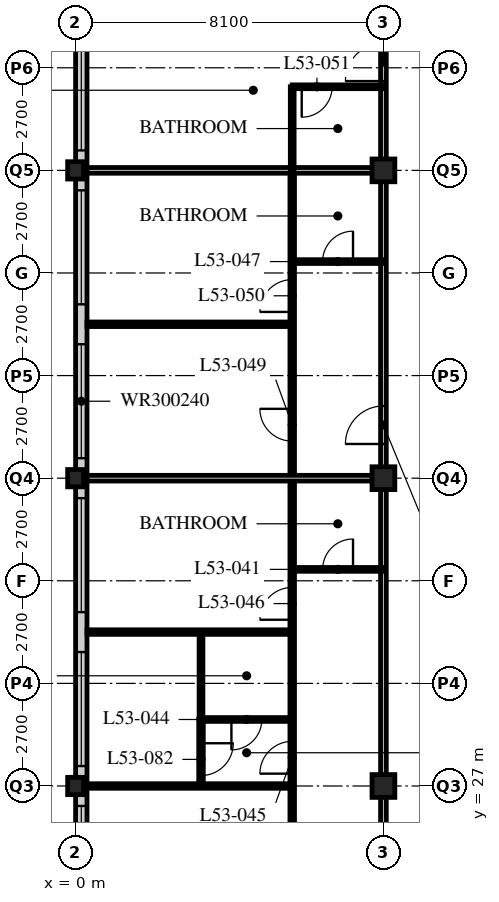
"""IFC4 building model, lengths in metres.
Left out: names, types, materials, properties, quantities, classifications, styles, units other than length and angle.
Written with IfcOpenShell. Run it as: python <this file> out.ifc"""

import sys

from ifc_helpers import new_model, si_unit, direction, frame, frame_2d, origin, origin_2d, place, context, subcontext, project, spatial, rectangle, hollow_rectangle, i_section, extrude, element, fill, save


model = new_model("IFC4")
c1 = context("Model", 3, precision=1e-05, world=origin(), true_north=direction((0.0, 1.0)))
c2 = subcontext(c1, "Body", "Model", "MODEL_VIEW")
j1 = project(units=[si_unit("LENGTHUNIT", "METRE"), si_unit("PLANEANGLEUNIT", "RADIAN")], contexts=[c1])
p1 = place(None, origin())
s1 = spatial("IfcSite", under=j1, at=p1, CompositionType="ELEMENT")
p2 = place(p1, origin())
s2 = spatial("IfcBuilding", under=s1, at=p2, CompositionType="ELEMENT")
p3 = place(p2, frame((0.0, 0.0, 206.4)))
s3 = spatial("IfcBuildingStorey", under=s2, at=p3, CompositionType="ELEMENT", Elevation=206.4)
for number, where, z_axis, x_axis in (
    (1, (0.0, 27.0, 0.0), (0.0, 0.0, 1.0), (1.0, 0.0, 0.0)),
    (2, (0.0, 35.1, 0.0), (0.0, 0.0, 1.0), (1.0, 0.0, 0.0)),
    (3, (0.0, 43.2, 0.0), (0.0, 0.0, 1.0), (1.0, 0.0, 0.0)),
):
    element("IfcColumn", number, at=place(p3, frame(where, z_axis=z_axis, x_axis=x_axis)), inside=s3, PredefinedType="COLUMN", context=c2, shape_type="SweptSolid", body=[
        extrude(i_section(OverallWidth=0.418, OverallDepth=0.456, WebThickness=0.042, FlangeThickness=0.067, FilletRadius=0.015, at=origin_2d()), origin(), (0.0, 0.0, 1.0), 3.6),
    ])
for number, where, z_axis, x_axis in (
    (4, (8.1, 27.0, 0.0), (0.0, 0.0, 1.0), (1.0, 0.0, 0.0)),
    (5, (8.1, 35.1, 0.0), (0.0, 0.0, 1.0), (1.0, 0.0, 0.0)),
    (6, (8.1, 43.2, 0.0), (0.0, 0.0, 1.0), (1.0, 0.0, 0.0)),
):
    element("IfcColumn", number, at=place(p3, frame(where, z_axis=z_axis, x_axis=x_axis)), inside=s3, PredefinedType="COLUMN", context=c2, shape_type="SweptSolid", body=[
        extrude(hollow_rectangle(XDim=0.6, YDim=0.6, WallThickness=0.05, at=origin_2d()), origin(), (0.0, 0.0, 1.0), 3.6),
    ])
p4 = place(p3, frame((0.15, 51.0, 0.0), z_axis=(0.0, 0.0, 1.0), x_axis=(0.0, -1.0, 0.0)))
e7 = element("IfcWall", 7, at=p4, inside=s3, PredefinedType="SOLIDWALL", context=c2, shape_type="SweptSolid", body=[
    extrude(rectangle(XDim=32.1, YDim=0.3, at=frame_2d((16.05, 0.0))), origin(), (0.0, 0.0, 1.0), 3.39),
])
p5 = place(p4, frame((0.225, 0.0, 0.6)))
e8 = element("IfcOpeningElement", 8, at=p5, cuts=e7, PredefinedType="OPENING", context=c2, shape_type="SweptSolid", body=[
    extrude(rectangle(XDim=3.0, YDim=2.4, at=frame_2d((1.5, 1.2))), frame((0.0, 0.16, 0.0), z_axis=(0.0, -1.0, 0.0), x_axis=(1.0, 0.0, 0.0)), (0.0, 0.0, 1.0), 0.32),
])
p6 = place(p4, frame((4.275, 0.0, 0.6)))
e9 = element("IfcOpeningElement", 9, at=p6, cuts=e7, PredefinedType="OPENING", context=c2, shape_type="SweptSolid", body=[
    extrude(rectangle(XDim=3.0, YDim=2.4, at=frame_2d((1.5, 1.2))), frame((0.0, 0.16, 0.0), z_axis=(0.0, -1.0, 0.0), x_axis=(1.0, 0.0, 0.0)), (0.0, 0.0, 1.0), 0.32),
])
p7 = place(p4, frame((8.325, 0.0, 0.6)))
e10 = element("IfcOpeningElement", 10, at=p7, cuts=e7, PredefinedType="OPENING", context=c2, shape_type="SweptSolid", body=[
    extrude(rectangle(XDim=3.0, YDim=2.4, at=frame_2d((1.5, 1.2))), frame((0.0, 0.16, 0.0), z_axis=(0.0, -1.0, 0.0), x_axis=(1.0, 0.0, 0.0)), (0.0, 0.0, 1.0), 0.32),
])
p8 = place(p4, frame((12.375, 0.0, 0.6)))
e11 = element("IfcOpeningElement", 11, at=p8, cuts=e7, PredefinedType="OPENING", context=c2, shape_type="SweptSolid", body=[
    extrude(rectangle(XDim=3.0, YDim=2.4, at=frame_2d((1.5, 1.2))), frame((0.0, 0.16, 0.0), z_axis=(0.0, -1.0, 0.0), x_axis=(1.0, 0.0, 0.0)), (0.0, 0.0, 1.0), 0.32),
])
p9 = place(p4, frame((16.425, 0.0, 0.6)))
e12 = element("IfcOpeningElement", 12, at=p9, cuts=e7, PredefinedType="OPENING", context=c2, shape_type="SweptSolid", body=[
    extrude(rectangle(XDim=3.0, YDim=2.4, at=frame_2d((1.5, 1.2))), frame((0.0, 0.16, 0.0), z_axis=(0.0, -1.0, 0.0), x_axis=(1.0, 0.0, 0.0)), (0.0, 0.0, 1.0), 0.32),
])
p10 = place(p4, frame((20.475, 0.0, 0.6)))
e13 = element("IfcOpeningElement", 13, at=p10, cuts=e7, PredefinedType="OPENING", context=c2, shape_type="SweptSolid", body=[
    extrude(rectangle(XDim=3.0, YDim=2.4, at=frame_2d((1.5, 1.2))), frame((0.0, 0.16, 0.0), z_axis=(0.0, -1.0, 0.0), x_axis=(1.0, 0.0, 0.0)), (0.0, 0.0, 1.0), 0.32),
])
p11 = place(p4, frame((24.525, 0.0, 0.6)))
e14 = element("IfcOpeningElement", 14, at=p11, cuts=e7, PredefinedType="OPENING", context=c2, shape_type="SweptSolid", body=[
    extrude(rectangle(XDim=3.0, YDim=2.4, at=frame_2d((1.5, 1.2))), frame((0.0, 0.16, 0.0), z_axis=(0.0, -1.0, 0.0), x_axis=(1.0, 0.0, 0.0)), (0.0, 0.0, 1.0), 0.32),
])
p12 = place(p4, frame((28.575, 0.0, 0.6)))
e15 = element("IfcOpeningElement", 15, at=p12, cuts=e7, PredefinedType="OPENING", context=c2, shape_type="SweptSolid", body=[
    extrude(rectangle(XDim=3.0, YDim=2.4, at=frame_2d((1.5, 1.2))), frame((0.0, 0.16, 0.0), z_axis=(0.0, -1.0, 0.0), x_axis=(1.0, 0.0, 0.0)), (0.0, 0.0, 1.0), 0.32),
])
p13 = place(p3, frame((8.1, 18.9, 0.0), z_axis=(0.0, 0.0, 1.0), x_axis=(0.0, 1.0, 0.0)))
e16 = element("IfcWall", 16, at=p13, inside=s3, PredefinedType="PARTITIONING", context=c2, shape_type="SweptSolid", body=[
    extrude(rectangle(XDim=28.35, YDim=0.15, at=frame_2d((14.175, 0.0))), origin(), (0.0, 0.0, 1.0), 2.778),
])
p14 = place(p13, frame((0.9, 0.0, 0.0)))
e17 = element("IfcOpeningElement", 17, at=p14, cuts=e16, PredefinedType="OPENING", context=c2, shape_type="SweptSolid", body=[
    extrude(rectangle(XDim=1.0, YDim=2.1, at=frame_2d((0.5, 1.05))), frame((0.0, 0.085, 0.0), z_axis=(0.0, -1.0, 0.0), x_axis=(1.0, 0.0, 0.0)), (0.0, 0.0, 1.0), 0.17),
])
p15 = place(p13, frame((17.1, 0.0, 0.0)))
e18 = element("IfcOpeningElement", 18, at=p15, cuts=e16, PredefinedType="OPENING", context=c2, shape_type="SweptSolid", body=[
    extrude(rectangle(XDim=1.0, YDim=2.1, at=frame_2d((0.5, 1.05))), frame((0.0, 0.085, 0.0), z_axis=(0.0, -1.0, 0.0), x_axis=(1.0, 0.0, 0.0)), (0.0, 0.0, 1.0), 0.17),
])
p16 = place(p13, frame((26.65, 0.0, 0.0)))
e19 = element("IfcOpeningElement", 19, at=p16, cuts=e16, PredefinedType="OPENING", context=c2, shape_type="SweptSolid", body=[
    extrude(rectangle(XDim=1.0, YDim=2.1, at=frame_2d((0.5, 1.05))), frame((0.0, 0.085, 0.0), z_axis=(0.0, -1.0, 0.0), x_axis=(1.0, 0.0, 0.0)), (0.0, 0.0, 1.0), 0.17),
])
p17 = place(p3, frame((5.7, 18.9, 0.0), z_axis=(0.0, 0.0, 1.0), x_axis=(0.0, 1.0, 0.0)))
e20 = element("IfcWall", 20, at=p17, inside=s3, PredefinedType="PARTITIONING", context=c2, shape_type="SweptSolid", body=[
    extrude(rectangle(XDim=24.3, YDim=0.12, at=frame_2d((12.15, 0.0))), origin(), (0.0, 0.0, 1.0), 3.39),
])
p18 = place(p17, frame((0.975, 0.0, 0.0)))
e21 = element("IfcOpeningElement", 21, at=p18, cuts=e20, PredefinedType="OPENING", context=c2, shape_type="SweptSolid", body=[
    extrude(rectangle(XDim=0.85, YDim=2.1, at=frame_2d((0.425, 1.05))), frame((0.0, 0.07, 0.0), z_axis=(0.0, -1.0, 0.0), x_axis=(1.0, 0.0, 0.0)), (0.0, 0.0, 1.0), 0.14),
])
p19 = place(p17, frame((8.425, 0.0, 0.0)))
e22 = element("IfcOpeningElement", 22, at=p19, cuts=e20, PredefinedType="OPENING", context=c2, shape_type="SweptSolid", body=[
    extrude(rectangle(XDim=0.85, YDim=2.1, at=frame_2d((0.425, 1.05))), frame((0.0, 0.07, 0.0), z_axis=(0.0, -1.0, 0.0), x_axis=(1.0, 0.0, 0.0)), (0.0, 0.0, 1.0), 0.14),
])
p20 = place(p17, frame((12.475, 0.0, 0.0)))
e23 = element("IfcOpeningElement", 23, at=p20, cuts=e20, PredefinedType="OPENING", context=c2, shape_type="SweptSolid", body=[
    extrude(rectangle(XDim=0.85, YDim=2.1, at=frame_2d((0.425, 1.05))), frame((0.0, 0.07, 0.0), z_axis=(0.0, -1.0, 0.0), x_axis=(1.0, 0.0, 0.0)), (0.0, 0.0, 1.0), 0.14),
])
p21 = place(p17, frame((17.175, 0.0, 0.0)))
e24 = element("IfcOpeningElement", 24, at=p21, cuts=e20, PredefinedType="OPENING", context=c2, shape_type="SweptSolid", body=[
    extrude(rectangle(XDim=0.85, YDim=2.1, at=frame_2d((0.425, 1.05))), frame((0.0, 0.07, 0.0), z_axis=(0.0, -1.0, 0.0), x_axis=(1.0, 0.0, 0.0)), (0.0, 0.0, 1.0), 0.14),
])
p22 = place(p17, frame((20.575, 0.0, 0.0)))
e25 = element("IfcOpeningElement", 25, at=p22, cuts=e20, PredefinedType="OPENING", context=c2, shape_type="SweptSolid", body=[
    extrude(rectangle(XDim=0.85, YDim=2.1, at=frame_2d((0.425, 1.05))), frame((0.0, 0.07, 0.0), z_axis=(0.0, -1.0, 0.0), x_axis=(1.0, 0.0, 0.0)), (0.0, 0.0, 1.0), 0.14),
])
p23 = place(p3, frame((8.1, 32.7, 0.0), z_axis=(0.0, 0.0, 1.0), x_axis=(-1.0, 0.0, 0.0)))
e26 = element("IfcWall", 26, at=p23, inside=s3, PredefinedType="PARTITIONING", context=c2, shape_type="SweptSolid", body=[
    extrude(rectangle(XDim=2.4, YDim=0.1, at=frame_2d((1.2, 0.0))), origin(), (0.0, 0.0, 1.0), 3.39),
])
p24 = place(p23, frame((0.8, 0.0, 0.0)))
e27 = element("IfcOpeningElement", 27, at=p24, cuts=e26, PredefinedType="OPENING", context=c2, shape_type="SweptSolid", body=[
    extrude(rectangle(XDim=0.8, YDim=2.1, at=frame_2d((0.4, 1.05))), frame((0.0, 0.06, 0.0), z_axis=(0.0, -1.0, 0.0), x_axis=(1.0, 0.0, 0.0)), (0.0, 0.0, 1.0), 0.12),
])
p25 = place(p3, frame((5.7, 28.75, 0.0), z_axis=(0.0, 0.0, 1.0), x_axis=(-1.0, 0.0, 0.0)))
e28 = element("IfcWall", 28, at=p25, inside=s3, PredefinedType="PARTITIONING", context=c2, shape_type="SweptSolid", body=[
    extrude(rectangle(XDim=2.4, YDim=0.1, at=frame_2d((1.2, 0.0))), origin(), (0.0, 0.0, 1.0), 3.39),
])
p26 = place(p25, frame((0.8, 0.0, 0.0)))
e29 = element("IfcOpeningElement", 29, at=p26, cuts=e28, PredefinedType="OPENING", context=c2, shape_type="SweptSolid", body=[
    extrude(rectangle(XDim=0.8, YDim=2.1, at=frame_2d((0.4, 1.05))), frame((0.0, 0.06, 0.0), z_axis=(0.0, -1.0, 0.0), x_axis=(1.0, 0.0, 0.0)), (0.0, 0.0, 1.0), 0.12),
])
p27 = place(p3, frame((3.3, 28.75, 0.0), z_axis=(0.0, 0.0, 1.0), x_axis=(0.0, 1.0, 0.0)))
e30 = element("IfcWall", 30, at=p27, inside=s3, PredefinedType="PARTITIONING", context=c2, shape_type="SweptSolid", body=[
    extrude(rectangle(XDim=2.3, YDim=0.1, at=frame_2d((1.15, 0.0))), origin(), (0.0, 0.0, 1.0), 3.39),
])
p28 = place(p3, frame((5.7, 27.0, 0.0), z_axis=(0.0, 0.0, 1.0), x_axis=(-1.0, 0.0, 0.0)))
e31 = element("IfcWall", 31, at=p28, inside=s3, PredefinedType="PARTITIONING", context=c2, shape_type="SweptSolid", body=[
    extrude(rectangle(XDim=5.4, YDim=0.12, at=frame_2d((2.7, 0.0))), origin(), (0.0, 0.0, 1.0), 2.778),
])
p29 = place(p3, frame((5.7, 31.05, 0.0), z_axis=(0.0, 0.0, 1.0), x_axis=(-1.0, 0.0, 0.0)))
e32 = element("IfcWall", 32, at=p29, inside=s3, PredefinedType="PARTITIONING", context=c2, shape_type="SweptSolid", body=[
    extrude(rectangle(XDim=5.4, YDim=0.12, at=frame_2d((2.7, 0.0))), origin(), (0.0, 0.0, 1.0), 3.39),
])
p30 = place(p3, frame((8.1, 35.1, 0.0), z_axis=(0.0, 0.0, 1.0), x_axis=(-1.0, 0.0, 0.0)))
e33 = element("IfcWall", 33, at=p30, inside=s3, PredefinedType="PARTITIONING", context=c2, shape_type="SweptSolid", body=[
    extrude(rectangle(XDim=7.8, YDim=0.15, at=frame_2d((3.9, 0.0))), origin(), (0.0, 0.0, 1.0), 2.778),
])
p31 = place(p3, frame((8.1, 40.8, 0.0), z_axis=(0.0, 0.0, 1.0), x_axis=(-1.0, 0.0, 0.0)))
e34 = element("IfcWall", 34, at=p31, inside=s3, PredefinedType="PARTITIONING", context=c2, shape_type="SweptSolid", body=[
    extrude(rectangle(XDim=2.4, YDim=0.1, at=frame_2d((1.2, 0.0))), origin(), (0.0, 0.0, 1.0), 3.39),
])
p32 = place(p31, frame((0.8, 0.0, 0.0)))
e35 = element("IfcOpeningElement", 35, at=p32, cuts=e34, PredefinedType="OPENING", context=c2, shape_type="SweptSolid", body=[
    extrude(rectangle(XDim=0.8, YDim=2.1, at=frame_2d((0.4, 1.05))), frame((0.0, 0.06, 0.0), z_axis=(0.0, -1.0, 0.0), x_axis=(1.0, 0.0, 0.0)), (0.0, 0.0, 1.0), 0.12),
])
p33 = place(p3, frame((5.7, 39.15, 0.0), z_axis=(0.0, 0.0, 1.0), x_axis=(-1.0, 0.0, 0.0)))
e36 = element("IfcWall", 36, at=p33, inside=s3, PredefinedType="PARTITIONING", context=c2, shape_type="SweptSolid", body=[
    extrude(rectangle(XDim=5.4, YDim=0.12, at=frame_2d((2.7, 0.0))), origin(), (0.0, 0.0, 1.0), 3.39),
])
p34 = place(p3, frame((8.1, 43.2, 0.0), z_axis=(0.0, 0.0, 1.0), x_axis=(-1.0, 0.0, 0.0)))
e37 = element("IfcWall", 37, at=p34, inside=s3, PredefinedType="PARTITIONING", context=c2, shape_type="SweptSolid", body=[
    extrude(rectangle(XDim=7.8, YDim=0.15, at=frame_2d((3.9, 0.0))), origin(), (0.0, 0.0, 1.0), 2.778),
])
p35 = place(p3, frame((5.7, 43.2, 0.0), z_axis=(0.0, 0.0, 1.0), x_axis=(0.0, 1.0, 0.0)))
e38 = element("IfcWall", 38, at=p35, inside=s3, PredefinedType="PARTITIONING", context=c2, shape_type="SweptSolid", body=[
    extrude(rectangle(XDim=2.2, YDim=0.1, at=frame_2d((1.1, 0.0))), origin(), (0.0, 0.0, 1.0), 3.39),
])
p36 = place(p3, frame((8.1, 45.4, 0.0), z_axis=(0.0, 0.0, 1.0), x_axis=(-1.0, 0.0, 0.0)))
e39 = element("IfcWall", 39, at=p36, inside=s3, PredefinedType="PARTITIONING", context=c2, shape_type="SweptSolid", body=[
    extrude(rectangle(XDim=2.4, YDim=0.1, at=frame_2d((1.2, 0.0))), origin(), (0.0, 0.0, 1.0), 3.39),
])
p37 = place(p36, frame((1.35, 0.0, 0.0)))
e40 = element("IfcOpeningElement", 40, at=p37, cuts=e39, PredefinedType="OPENING", context=c2, shape_type="SweptSolid", body=[
    extrude(rectangle(XDim=0.8, YDim=2.1, at=frame_2d((0.4, 1.05))), frame((0.0, 0.06, 0.0), z_axis=(0.0, -1.0, 0.0), x_axis=(1.0, 0.0, 0.0)), (0.0, 0.0, 1.0), 0.12),
])
p38 = place(p3, frame((3.3, 27.0, 0.0), z_axis=(0.0, 0.0, 1.0), x_axis=(0.0, 1.0, 0.0)))
e41 = element("IfcWall", 41, at=p38, inside=s3, PredefinedType="PARTITIONING", context=c2, shape_type="SweptSolid", body=[
    extrude(rectangle(XDim=1.76, YDim=0.12, at=frame_2d((0.88, 0.0))), origin(), (0.0, 0.0, 1.0), 3.39),
])
p39 = place(p38, frame((0.275, 0.0, 0.0)))
e42 = element("IfcOpeningElement", 42, at=p39, cuts=e41, PredefinedType="OPENING", context=c2, shape_type="SweptSolid", body=[
    extrude(rectangle(XDim=0.85, YDim=2.1, at=frame_2d((0.425, 1.05))), frame((0.0, 0.07, 0.0), z_axis=(0.0, -1.0, 0.0), x_axis=(1.0, 0.0, 0.0)), (0.0, 0.0, 1.0), 0.14),
])
p40 = place(p6, origin())
e43 = element("IfcWindow", 43, at=p40, inside=s3, PartitioningType="SINGLE_PANEL", PredefinedType="WINDOW", context=c2, shape_type="SweptSolid", body=[
    extrude(rectangle(XDim=3.0, YDim=2.4, at=frame_2d((1.5, 1.2))), frame((0.0, 0.03, 0.0), z_axis=(0.0, -1.0, 0.0), x_axis=(1.0, 0.0, 0.0)), (0.0, 0.0, 1.0), 0.06),
])
fill(e9, e43)
p41 = place(p7, origin())
e44 = element("IfcWindow", 44, at=p41, inside=s3, PartitioningType="SINGLE_PANEL", PredefinedType="WINDOW", context=c2, shape_type="SweptSolid", body=[
    extrude(rectangle(XDim=3.0, YDim=2.4, at=frame_2d((1.5, 1.2))), frame((0.0, 0.03, 0.0), z_axis=(0.0, -1.0, 0.0), x_axis=(1.0, 0.0, 0.0)), (0.0, 0.0, 1.0), 0.06),
])
fill(e10, e44)
p42 = place(p8, origin())
e45 = element("IfcWindow", 45, at=p42, inside=s3, PartitioningType="SINGLE_PANEL", PredefinedType="WINDOW", context=c2, shape_type="SweptSolid", body=[
    extrude(rectangle(XDim=3.0, YDim=2.4, at=frame_2d((1.5, 1.2))), frame((0.0, 0.03, 0.0), z_axis=(0.0, -1.0, 0.0), x_axis=(1.0, 0.0, 0.0)), (0.0, 0.0, 1.0), 0.06),
])
fill(e11, e45)
p43 = place(p9, origin())
e46 = element("IfcWindow", 46, at=p43, inside=s3, PartitioningType="SINGLE_PANEL", PredefinedType="WINDOW", context=c2, shape_type="SweptSolid", body=[
    extrude(rectangle(XDim=3.0, YDim=2.4, at=frame_2d((1.5, 1.2))), frame((0.0, 0.03, 0.0), z_axis=(0.0, -1.0, 0.0), x_axis=(1.0, 0.0, 0.0)), (0.0, 0.0, 1.0), 0.06),
])
fill(e12, e46)
p44 = place(p10, origin())
e47 = element("IfcWindow", 47, at=p44, inside=s3, PartitioningType="SINGLE_PANEL", PredefinedType="WINDOW", context=c2, shape_type="SweptSolid", body=[
    extrude(rectangle(XDim=3.0, YDim=2.4, at=frame_2d((1.5, 1.2))), frame((0.0, 0.03, 0.0), z_axis=(0.0, -1.0, 0.0), x_axis=(1.0, 0.0, 0.0)), (0.0, 0.0, 1.0), 0.06),
])
fill(e13, e47)
p45 = place(p11, origin())
e48 = element("IfcWindow", 48, at=p45, inside=s3, PartitioningType="SINGLE_PANEL", PredefinedType="WINDOW", context=c2, shape_type="SweptSolid", body=[
    extrude(rectangle(XDim=3.0, YDim=2.4, at=frame_2d((1.5, 1.2))), frame((0.0, 0.03, 0.0), z_axis=(0.0, -1.0, 0.0), x_axis=(1.0, 0.0, 0.0)), (0.0, 0.0, 1.0), 0.06),
])
fill(e14, e48)
p46 = place(p24, origin())
e49 = element("IfcDoor", 49, at=p46, inside=s3, OperationType="SINGLE_SWING_RIGHT", PredefinedType="DOOR", context=c2, shape_type="SweptSolid", body=[
    extrude(rectangle(XDim=0.8, YDim=2.1, at=frame_2d((0.4, 1.05))), frame((0.0, 0.025, 0.0), z_axis=(0.0, -1.0, 0.0), x_axis=(1.0, 0.0, 0.0)), (0.0, 0.0, 1.0), 0.05),
])
fill(e27, e49)
p47 = place(p26, origin())
e50 = element("IfcDoor", 50, at=p47, inside=s3, OperationType="SINGLE_SWING_RIGHT", PredefinedType="DOOR", context=c2, shape_type="SweptSolid", body=[
    extrude(rectangle(XDim=0.8, YDim=2.1, at=frame_2d((0.4, 1.05))), frame((0.0, 0.025, 0.0), z_axis=(0.0, -1.0, 0.0), x_axis=(1.0, 0.0, 0.0)), (0.0, 0.0, 1.0), 0.05),
])
fill(e29, e50)
p48 = place(p19, origin())
e51 = element("IfcDoor", 51, at=p48, inside=s3, OperationType="SINGLE_SWING_LEFT", PredefinedType="DOOR", context=c2, shape_type="SweptSolid", body=[
    extrude(rectangle(XDim=0.85, YDim=2.1, at=frame_2d((0.425, 1.05))), frame((0.0, 0.025, 0.0), z_axis=(0.0, -1.0, 0.0), x_axis=(1.0, 0.0, 0.0)), (0.0, 0.0, 1.0), 0.05),
])
fill(e22, e51)
p49 = place(p20, origin())
e52 = element("IfcDoor", 52, at=p49, inside=s3, OperationType="SINGLE_SWING_LEFT", PredefinedType="DOOR", context=c2, shape_type="SweptSolid", body=[
    extrude(rectangle(XDim=0.85, YDim=2.1, at=frame_2d((0.425, 1.05))), frame((0.0, 0.025, 0.0), z_axis=(0.0, -1.0, 0.0), x_axis=(1.0, 0.0, 0.0)), (0.0, 0.0, 1.0), 0.05),
])
fill(e23, e52)
p50 = place(p32, origin())
e53 = element("IfcDoor", 53, at=p50, inside=s3, OperationType="SINGLE_SWING_RIGHT", PredefinedType="DOOR", context=c2, shape_type="SweptSolid", body=[
    extrude(rectangle(XDim=0.8, YDim=2.1, at=frame_2d((0.4, 1.05))), frame((0.0, 0.025, 0.0), z_axis=(0.0, -1.0, 0.0), x_axis=(1.0, 0.0, 0.0)), (0.0, 0.0, 1.0), 0.05),
])
fill(e35, e53)
p51 = place(p15, origin())
e54 = element("IfcDoor", 54, at=p51, inside=s3, OperationType="SINGLE_SWING_LEFT", PredefinedType="DOOR", context=c2, shape_type="SweptSolid", body=[
    extrude(rectangle(XDim=1.0, YDim=2.1, at=frame_2d((0.5, 1.05))), frame((0.0, 0.025, 0.0), z_axis=(0.0, -1.0, 0.0), x_axis=(1.0, 0.0, 0.0)), (0.0, 0.0, 1.0), 0.05),
])
fill(e18, e54)
p52 = place(p21, origin())
e55 = element("IfcDoor", 55, at=p52, inside=s3, OperationType="SINGLE_SWING_RIGHT", PredefinedType="DOOR", context=c2, shape_type="SweptSolid", body=[
    extrude(rectangle(XDim=0.85, YDim=2.1, at=frame_2d((0.425, 1.05))), frame((0.0, 0.025, 0.0), z_axis=(0.0, -1.0, 0.0), x_axis=(1.0, 0.0, 0.0)), (0.0, 0.0, 1.0), 0.05),
])
fill(e24, e55)
p53 = place(p22, origin())
e56 = element("IfcDoor", 56, at=p53, inside=s3, OperationType="SINGLE_SWING_LEFT", PredefinedType="DOOR", context=c2, shape_type="SweptSolid", body=[
    extrude(rectangle(XDim=0.85, YDim=2.1, at=frame_2d((0.425, 1.05))), frame((0.0, 0.025, 0.0), z_axis=(0.0, -1.0, 0.0), x_axis=(1.0, 0.0, 0.0)), (0.0, 0.0, 1.0), 0.05),
])
fill(e25, e56)
p54 = place(p37, origin())
e57 = element("IfcDoor", 57, at=p54, inside=s3, OperationType="SINGLE_SWING_RIGHT", PredefinedType="DOOR", context=c2, shape_type="SweptSolid", body=[
    extrude(rectangle(XDim=0.8, YDim=2.1, at=frame_2d((0.4, 1.05))), frame((0.0, 0.025, 0.0), z_axis=(0.0, -1.0, 0.0), x_axis=(1.0, 0.0, 0.0)), (0.0, 0.0, 1.0), 0.05),
])
fill(e40, e57)
p55 = place(p16, origin())
e58 = element("IfcDoor", 58, at=p55, inside=s3, OperationType="SINGLE_SWING_LEFT", PredefinedType="DOOR", context=c2, shape_type="SweptSolid", body=[
    extrude(rectangle(XDim=1.0, YDim=2.1, at=frame_2d((0.5, 1.05))), frame((0.0, 0.025, 0.0), z_axis=(0.0, -1.0, 0.0), x_axis=(1.0, 0.0, 0.0)), (0.0, 0.0, 1.0), 0.05),
])
fill(e19, e58)
p56 = place(p39, origin())
e59 = element("IfcDoor", 59, at=p56, inside=s3, OperationType="SINGLE_SWING_LEFT", PredefinedType="DOOR", context=c2, shape_type="SweptSolid", body=[
    extrude(rectangle(XDim=0.85, YDim=2.1, at=frame_2d((0.425, 1.05))), frame((0.0, 0.025, 0.0), z_axis=(0.0, -1.0, 0.0), x_axis=(1.0, 0.0, 0.0)), (0.0, 0.0, 1.0), 0.05),
])
fill(e42, e59)
save(model, sys.argv[1])
